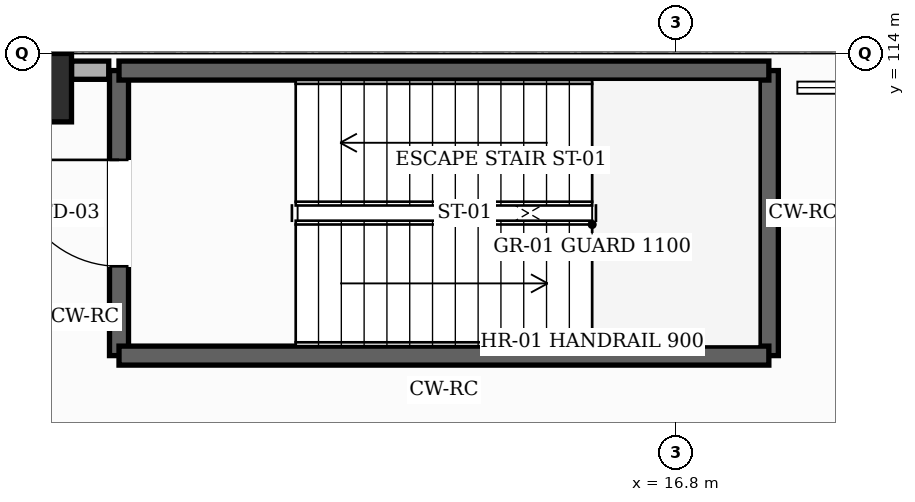
"""IFC4 building model, lengths in metres.
Left out: names, types, materials, properties, quantities, classifications, styles, units other than length and angle.
Written with IfcOpenShell. Run it as: python <this file> out.ifc"""

import sys

from ifc_helpers import new_model, si_unit, direction, frame, frame_2d, origin, origin_2d, place, context, subcontext, project, spatial, rectangle, hollow_rectangle, extrude, element, fill, save


model = new_model("IFC4")
c1 = context("Model", 3, precision=1e-05, world=origin(), true_north=direction((0.0, 1.0)))
c2 = subcontext(c1, "Body", "Model", "MODEL_VIEW")
j1 = project(units=[si_unit("LENGTHUNIT", "METRE"), si_unit("PLANEANGLEUNIT", "RADIAN")], contexts=[c1])
p1 = place(None, origin())
s1 = spatial("IfcSite", under=j1, at=p1, CompositionType="ELEMENT")
p2 = place(p1, origin())
s2 = spatial("IfcBuilding", under=s1, at=p2, CompositionType="ELEMENT")
p3 = place(p2, frame((0.0, 0.0, 5.4)))
s3 = spatial("IfcBuildingStorey", under=s2, at=p3, CompositionType="ELEMENT", Elevation=5.4)
p4 = place(p3, frame((8.4, 113.55, 0.0), z_axis=(0.0, 0.0, 1.0), x_axis=(1.0, 0.0, 0.0)))
e1 = element("IfcColumn", 1, at=p4, inside=s3, PredefinedType="COLUMN", context=c2, shape_type="SweptSolid", body=[
    extrude(hollow_rectangle(XDim=0.9, YDim=0.9, WallThickness=0.032, InnerFilletRadius=0.032, OuterFilletRadius=0.064, at=origin_2d()), origin(), (0.0, 0.0, 1.0), 4.8),
])
p5 = place(p3, frame((8.85, 113.78, 0.0), z_axis=(0.0, 0.0, 1.0), x_axis=(1.0, 0.0, 0.0)))
e2 = element("IfcWall", 2, at=p5, inside=s3, PredefinedType="SOLIDWALL", context=c2, shape_type="SweptSolid", body=[
    extrude(rectangle(XDim=0.49, YDim=0.24, at=frame_2d((0.245, 0.0))), origin(), (0.0, 0.0, 1.0), 4.535),
])
p6 = place(p3, frame((9.475, 110.025, 0.0), z_axis=(0.0, 0.0, 1.0), x_axis=(0.0, 1.0, 0.0)))
e3 = element("IfcWall", 3, at=p6, inside=s3, PredefinedType="SHEAR", context=c2, shape_type="SweptSolid", body=[
    extrude(rectangle(XDim=3.75, YDim=0.25, at=frame_2d((1.875, 0.0))), origin(), (0.0, 0.0, 1.0), 4.55),
])
p7 = place(p6, frame((1.175, 0.0, 0.0)))
e4 = element("IfcOpeningElement", 4, at=p7, cuts=e3, PredefinedType="OPENING", context=c2, shape_type="SweptSolid", body=[
    extrude(rectangle(XDim=1.4, YDim=2.25, at=frame_2d((0.7, 1.125))), frame((0.0, 0.135, 0.0), z_axis=(0.0, -1.0, 0.0), x_axis=(1.0, 0.0, 0.0)), (0.0, 0.0, 1.0), 0.27),
])
p8 = place(p3, frame((18.025, 113.775, 0.0), z_axis=(0.0, 0.0, 1.0), x_axis=(0.0, -1.0, 0.0)))
e5 = element("IfcWall", 5, at=p8, inside=s3, PredefinedType="SHEAR", context=c2, shape_type="SweptSolid", body=[
    extrude(rectangle(XDim=3.75, YDim=0.25, at=frame_2d((1.875, 0.0))), origin(), (0.0, 0.0, 1.0), 4.55),
])
for number, where, z_axis, x_axis in (
    (6, (18.025, 110.025, 0.0), (0.0, 0.0, 1.0), (-1.0, 0.0, 0.0)),
    (7, (9.475, 113.775, 0.0), (0.0, 0.0, 1.0), (1.0, 0.0, 0.0)),
):
    element("IfcWall", number, at=place(p3, frame(where, z_axis=z_axis, x_axis=x_axis)), inside=s3, PredefinedType="SHEAR", context=c2, shape_type="SweptSolid", body=[
        extrude(rectangle(XDim=8.55, YDim=0.25, at=frame_2d((4.275, 0.0))), origin(), (0.0, 0.0, 1.0), 4.55),
    ])
p9 = place(p7, origin())
e8 = element("IfcDoor", 8, at=p9, inside=s3, OperationType="SINGLE_SWING_RIGHT", PredefinedType="DOOR", context=c2, shape_type="SweptSolid", body=[
    extrude(rectangle(XDim=1.4, YDim=2.25, at=frame_2d((0.7, 1.125))), frame((0.0, 0.025, 0.0), z_axis=(0.0, -1.0, 0.0), x_axis=(1.0, 0.0, 0.0)), (0.0, 0.0, 1.0), 0.05),
])
fill(e4, e8)
save(model, sys.argv[1])
